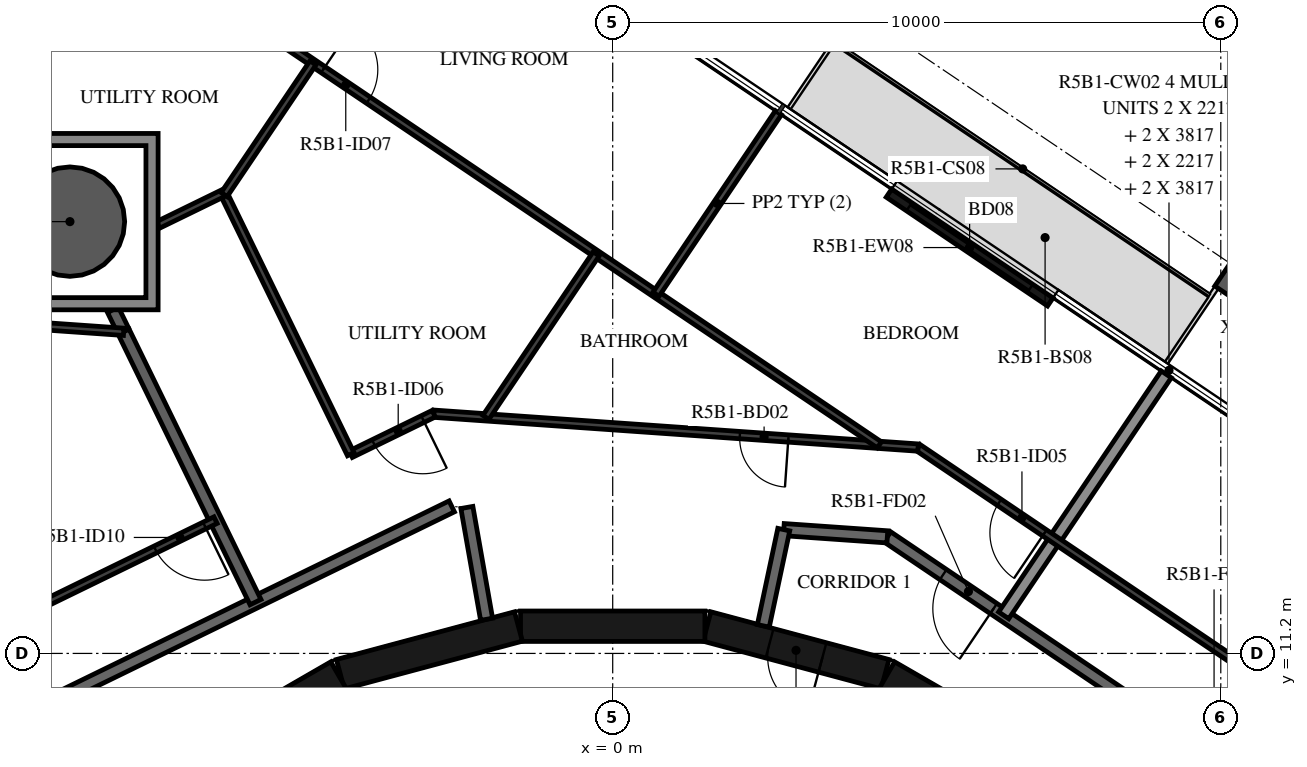
"""IFC4 building model, lengths in metres.
Left out: names, types, materials, properties, quantities, classifications, styles, units other than length and angle.
Written with IfcOpenShell. Run it as: python <this file> out.ifc"""

import sys

from ifc_helpers import new_model, si_unit, direction, frame, frame_2d, origin, origin_2d, place, context, subcontext, project, spatial, polyline, rectangle, hollow_circle, i_section, outline, extrude, element, fill, save


model = new_model("IFC4")
c1 = context("Model", 3, precision=1e-05, world=origin(), true_north=direction((0.0, 1.0)))
c2 = subcontext(c1, "Body", "Model", "MODEL_VIEW")
j1 = project(units=[si_unit("LENGTHUNIT", "METRE"), si_unit("PLANEANGLEUNIT", "RADIAN")], contexts=[c1])
p1 = place(None, origin())
s1 = spatial("IfcSite", under=j1, at=p1, CompositionType="ELEMENT")
p2 = place(p1, origin())
s2 = spatial("IfcBuilding", under=s1, at=p2, CompositionType="ELEMENT")
p3 = place(p2, frame((0.0, 0.0, 198.9)))
s3 = spatial("IfcBuildingStorey", under=s2, at=p3, CompositionType="ELEMENT", Elevation=198.9)
p4 = place(p3, frame((-8.926, 18.301, -0.38), z_axis=(0.0, 0.0, 1.0), x_axis=(1.0, 0.0, 0.0)))
e1 = element("IfcColumn", 1, at=p4, inside=s3, PredefinedType="COLUMN", context=c2, shape_type="SweptSolid", body=[
    extrude(hollow_circle(Radius=0.9, WallThickness=0.04, at=origin_2d()), origin(), (0.0, 0.0, 1.0), 3.5),
])
p5 = place(p3, frame((10.278, 17.531, -0.38), z_axis=(0.0, 0.0, 1.0), x_axis=(0.829037661466, -0.559192771654, 0.0)))
e2 = element("IfcColumn", 2, at=p5, inside=s3, PredefinedType="COLUMN", context=c2, shape_type="SweptSolid", body=[
    extrude(i_section(OverallWidth=0.3, OverallDepth=0.9, WebThickness=0.019, FlangeThickness=0.035, FilletRadius=0.03, at=origin_2d()), origin(), (0.0, 0.0, 1.0), 3.5),
])
p6 = place(p3, frame((7.196, 16.98, 0.0), z_axis=(0.0, 0.0, 1.0), x_axis=(-0.829044984211, 0.559181915082, 0.0)))
e3 = element("IfcWall", 3, at=p6, inside=s3, PredefinedType="STANDARD", context=c2, shape_type="SweptSolid", body=[
    extrude(rectangle(XDim=3.2, YDim=0.16, at=frame_2d((1.6, 0.0))), origin(), (0.0, 0.0, 1.0), 3.12),
])
p7 = place(p6, frame((0.4, 0.0, 0.0)))
e4 = element("IfcOpeningElement", 4, at=p7, cuts=e3, PredefinedType="OPENING", context=c2, shape_type="SweptSolid", body=[
    extrude(rectangle(XDim=2.4, YDim=2.4, at=frame_2d((1.2, 1.2))), frame((0.0, 0.09, 0.0), z_axis=(0.0, -1.0, 0.0), x_axis=(1.0, 0.0, 0.0)), (0.0, 0.0, 1.0), 0.18),
])
p8 = place(p3, frame((7.137, 9.329, 0.0), z_axis=(0.0, 0.0, 1.0), x_axis=(-0.865975092491, 0.500087131594, 0.0)))
e5 = element("IfcWall", 5, at=p8, inside=s3, PredefinedType="SHEAR", context=c2, shape_type="SweptSolid", body=[
    extrude(rectangle(XDim=3.033, YDim=0.5, at=frame_2d((1.516, 0.0))), origin(), (0.0, 0.0, 1.0), 3.12),
])
p9 = place(p3, frame((4.479, 10.858, 0.0), z_axis=(0.0, 0.0, 1.0), x_axis=(-0.965948410781, 0.258734743916, 0.0)))
e6 = element("IfcWall", 6, at=p9, inside=s3, PredefinedType="SHEAR", context=c2, shape_type="SweptSolid", body=[
    extrude(rectangle(XDim=3.033, YDim=0.5, at=frame_2d((1.516, 0.0))), origin(), (0.0, 0.0, 1.0), 3.12),
])
p10 = place(p9, frame((1.066, 0.0, 0.0)))
e7 = element("IfcOpeningElement", 7, at=p10, cuts=e6, PredefinedType="OPENING", context=c2, shape_type="SweptSolid", body=[
    extrude(rectangle(XDim=0.9, YDim=2.1, at=frame_2d((0.45, 1.05))), frame((0.0, 0.26, 0.0), z_axis=(0.0, -1.0, 0.0), x_axis=(1.0, 0.0, 0.0)), (0.0, 0.0, 1.0), 0.52),
])
for number, where, z_axis, x_axis in (
    (8, (1.516, 11.647, 0.0), (0.0, 0.0, 1.0), (-1.0, 0.0, 0.0)),
    (9, (-1.55, 11.643, 0.0), (0.0, 0.0, 1.0), (-0.966, -0.259, 0.0)),
    (10, (-4.51, 10.845, 0.0), (0.0, 0.0, 1.0), (-0.866, -0.5, 0.0)),
):
    element("IfcWall", number, at=place(p3, frame(where, z_axis=z_axis, x_axis=x_axis)), inside=s3, PredefinedType="SHEAR", context=c2, shape_type="SweptSolid", body=[
        extrude(rectangle(XDim=3.033, YDim=0.5, at=frame_2d((1.516, 0.0))), origin(), (0.0, 0.0, 1.0), 3.12),
    ])
p11 = place(p3, frame((10.47, 9.101, 0.0), z_axis=(0.0, 0.0, 1.0), x_axis=(-0.829035841718, 0.559195469534, 0.0)))
e11 = element("IfcWall", 11, at=p11, inside=s3, PredefinedType="STANDARD", context=c2, shape_type="SweptSolid", body=[
    extrude(rectangle(XDim=7.181, YDim=0.2, at=frame_2d((3.591, 0.0))), origin(), (0.0, 0.0, 1.0), 3.12),
])
p12 = place(p11, frame((0.2, 0.0, 0.0)))
e12 = element("IfcOpeningElement", 12, at=p12, cuts=e11, PredefinedType="OPENING", context=c2, shape_type="SweptSolid", body=[
    extrude(rectangle(XDim=1.0, YDim=2.1, at=frame_2d((0.5, 1.05))), frame((0.0, 0.11, 0.0), z_axis=(0.0, -1.0, 0.0), x_axis=(1.0, 0.0, 0.0)), (0.0, 0.0, 1.0), 0.22),
])
p13 = place(p11, frame((5.073, 0.0, 0.0)))
e13 = element("IfcOpeningElement", 13, at=p13, cuts=e11, PredefinedType="OPENING", context=c2, shape_type="SweptSolid", body=[
    extrude(rectangle(XDim=1.0, YDim=2.1, at=frame_2d((0.5, 1.05))), frame((0.0, 0.11, 0.0), z_axis=(0.0, -1.0, 0.0), x_axis=(1.0, 0.0, 0.0)), (0.0, 0.0, 1.0), 0.22),
])
p14 = place(p3, frame((4.517, 13.117, 0.0), z_axis=(0.0, 0.0, 1.0), x_axis=(-0.997562153664, 0.069783591025, 0.0)))
e14 = element("IfcWall", 14, at=p14, inside=s3, PredefinedType="STANDARD", context=c2, shape_type="SweptSolid", body=[
    extrude(rectangle(XDim=1.707, YDim=0.2, at=frame_2d((0.854, 0.0))), origin(), (0.0, 0.0, 1.0), 3.12),
])
p15 = place(p3, frame((2.813, 13.236, 0.0), z_axis=(0.0, 0.0, 1.0), x_axis=(-0.207911086063, -0.978147729278, 0.0)))
e15 = element("IfcWall", 15, at=p15, inside=s3, PredefinedType="STANDARD", context=c2, shape_type="SweptSolid", body=[
    extrude(rectangle(XDim=1.618, YDim=0.2, at=frame_2d((0.809, 0.0))), origin(), (0.0, 0.0, 1.0), 3.12),
])
p16 = place(p3, frame((-2.074, 11.761, 0.0), z_axis=(0.0, 0.0, 1.0), x_axis=(-0.173740587112, 0.984791454263, 0.0)))
e16 = element("IfcWall", 16, at=p16, inside=s3, PredefinedType="STANDARD", context=c2, shape_type="SweptSolid", body=[
    extrude(rectangle(XDim=1.867, YDim=0.2, at=frame_2d((0.934, 0.0))), origin(), (0.0, 0.0, 1.0), 3.12),
])
p17 = place(p3, frame((-2.647, 13.618, 0.0), z_axis=(0.0, 0.0, 1.0), x_axis=(-0.898796543751, -0.438366026218, 0.0)))
e17 = element("IfcWall", 17, at=p17, inside=s3, PredefinedType="STANDARD", context=c2, shape_type="SweptSolid", body=[
    extrude(rectangle(XDim=7.181, YDim=0.2, at=frame_2d((3.591, 0.0))), origin(), (0.0, 0.0, 1.0), 3.12),
])
p18 = place(p3, frame((9.104, 15.79, 0.0), z_axis=(0.0, 0.0, 1.0), x_axis=(-0.559193912135, -0.829036892201, 0.0)))
e18 = element("IfcWall", 18, at=p18, inside=s3, PredefinedType="STANDARD", context=c2, shape_type="SweptSolid", body=[
    extrude(rectangle(XDim=4.781, YDim=0.2, at=frame_2d((2.39, 0.0))), origin(), (0.0, 0.0, 1.0), 2.73),
])
p19 = place(p3, frame((-8.042, 16.489, 0.0), z_axis=(0.0, 0.0, 1.0), x_axis=(0.438345825707, -0.898806395774, 0.0)))
e19 = element("IfcWall", 19, at=p19, inside=s3, PredefinedType="STANDARD", context=c2, shape_type="SweptSolid", body=[
    extrude(rectangle(XDim=4.946, YDim=0.2, at=frame_2d((2.473, 0.0))), origin(), (0.0, 0.0, 1.0), 3.12),
])
p20 = place(p3, frame((-8.219, 16.851, 0.0), z_axis=(0.0, 0.0, 1.0), x_axis=(0.438281645094, -0.898837693676, 0.0)))
e20 = element("IfcWall", 20, at=p20, inside=s3, PredefinedType="STANDARD", context=c2, shape_type="SweptSolid", body=[
    extrude(rectangle(XDim=0.373, YDim=0.2, at=frame_2d((0.186, 0.0))), origin(), (0.0, 0.0, 1.0), 3.12),
])
p21 = place(p3, frame((11.642, 10.12, 0.0), z_axis=(0.0, 0.0, 1.0), x_axis=(-0.829032241779, 0.55920080659, 0.0)))
e21 = element("IfcWall", 21, at=p21, inside=s3, PredefinedType="PARTITIONING", context=c2, shape_type="SweptSolid", body=[
    extrude(rectangle(XDim=7.985, YDim=0.12, at=frame_2d((3.992, 0.0))), origin(), (0.0, 0.0, 1.0), 3.12),
])
p22 = place(p21, frame((0.2, 0.0, 0.0)))
e22 = element("IfcOpeningElement", 22, at=p22, cuts=e21, PredefinedType="OPENING", context=c2, shape_type="SweptSolid", body=[
    extrude(rectangle(XDim=0.9, YDim=2.1, at=frame_2d((0.45, 1.05))), frame((0.0, 0.07, 0.0), z_axis=(0.0, -1.0, 0.0), x_axis=(1.0, 0.0, 0.0)), (0.0, 0.0, 1.0), 0.14),
])
p23 = place(p21, frame((5.475, 0.0, 0.0)))
e23 = element("IfcOpeningElement", 23, at=p23, cuts=e21, PredefinedType="OPENING", context=c2, shape_type="SweptSolid", body=[
    extrude(rectangle(XDim=0.9, YDim=2.1, at=frame_2d((0.45, 1.05))), frame((0.0, 0.07, 0.0), z_axis=(0.0, -1.0, 0.0), x_axis=(1.0, 0.0, 0.0)), (0.0, 0.0, 1.0), 0.14),
])
p24 = place(p3, frame((5.022, 14.585, 0.0), z_axis=(0.0, 0.0, 1.0), x_axis=(-0.997565118395, 0.069741197017, 0.0)))
e24 = element("IfcWall", 24, at=p24, inside=s3, PredefinedType="PARTITIONING", context=c2, shape_type="SweptSolid", body=[
    extrude(rectangle(XDim=7.985, YDim=0.12, at=frame_2d((3.993, 0.0))), origin(), (0.0, 0.0, 1.0), 3.12),
])
p25 = place(p24, frame((2.138, 0.0, 0.0)))
e25 = element("IfcOpeningElement", 25, at=p25, cuts=e24, PredefinedType="OPENING", context=c2, shape_type="SweptSolid", body=[
    extrude(rectangle(XDim=0.8, YDim=2.1, at=frame_2d((0.4, 1.05))), frame((0.0, 0.07, 0.0), z_axis=(0.0, -1.0, 0.0), x_axis=(1.0, 0.0, 0.0)), (0.0, 0.0, 1.0), 0.14),
])
p26 = place(p3, frame((-2.943, 15.142, 0.0), z_axis=(0.0, 0.0, 1.0), x_axis=(-0.898853439798, -0.438249351127, 0.0)))
e26 = element("IfcWall", 26, at=p26, inside=s3, PredefinedType="PARTITIONING", context=c2, shape_type="SweptSolid", body=[
    extrude(rectangle(XDim=1.518, YDim=0.12, at=frame_2d((0.759, 0.0))), origin(), (0.0, 0.0, 1.0), 3.12),
])
p27 = place(p26, frame((0.2, 0.0, 0.0)))
e27 = element("IfcOpeningElement", 27, at=p27, cuts=e26, PredefinedType="OPENING", context=c2, shape_type="SweptSolid", body=[
    extrude(rectangle(XDim=0.9, YDim=2.1, at=frame_2d((0.45, 1.05))), frame((0.0, 0.07, 0.0), z_axis=(0.0, -1.0, 0.0), x_axis=(1.0, 0.0, 0.0)), (0.0, 0.0, 1.0), 0.14),
])
p28 = place(p3, frame((-4.308, 14.477, 0.0), z_axis=(0.0, 0.0, 1.0), x_axis=(-0.43837096777, 0.898794133613, 0.0)))
e28 = element("IfcWall", 28, at=p28, inside=s3, PredefinedType="PARTITIONING", context=c2, shape_type="SweptSolid", body=[
    extrude(rectangle(XDim=4.75, YDim=0.12, at=frame_2d((2.375, 0.0))), origin(), (0.0, 0.0, 1.0), 3.12),
])
p29 = place(p3, frame((-6.402, 18.771, 0.0), z_axis=(0.0, 0.0, 1.0), x_axis=(-0.898797905192, -0.438363234797, 0.0)))
e29 = element("IfcWall", 29, at=p29, inside=s3, PredefinedType="PARTITIONING", context=c2, shape_type="SweptSolid", body=[
    extrude(rectangle(XDim=1.195, YDim=0.12, at=frame_2d((0.597, 0.0))), origin(), (0.0, 0.0, 1.0), 3.12),
])
p30 = place(p3, frame((-6.292, 21.831, 0.0), z_axis=(0.0, 0.0, 1.0), x_axis=(0.829040041754, -0.559189242715, 0.0)))
e30 = element("IfcWall", 30, at=p30, inside=s3, PredefinedType="PARTITIONING", context=c2, shape_type="SweptSolid", body=[
    extrude(rectangle(XDim=12.879, YDim=0.12, at=frame_2d((6.439, 0.0))), origin(), (0.0, 0.0, 1.0), 3.12),
])
p31 = place(p30, frame((1.844, 0.0, 0.0)))
e31 = element("IfcOpeningElement", 31, at=p31, cuts=e30, PredefinedType="OPENING", context=c2, shape_type="SweptSolid", body=[
    extrude(rectangle(XDim=0.9, YDim=2.1, at=frame_2d((0.45, 1.05))), frame((0.0, 0.07, 0.0), z_axis=(0.0, -1.0, 0.0), x_axis=(1.0, 0.0, 0.0)), (0.0, 0.0, 1.0), 0.14),
])
p32 = place(p30, frame((0.2, 0.0, 0.0)))
e32 = element("IfcOpeningElement", 32, at=p32, cuts=e30, PredefinedType="OPENING", context=c2, shape_type="SweptSolid", body=[
    extrude(rectangle(XDim=0.9, YDim=2.1, at=frame_2d((0.45, 1.05))), frame((0.0, 0.07, 0.0), z_axis=(0.0, -1.0, 0.0), x_axis=(1.0, 0.0, 0.0)), (0.0, 0.0, 1.0), 0.14),
])
p33 = place(p3, frame((2.725, 20.092, 0.0), z_axis=(0.0, 0.0, 1.0), x_axis=(-0.559230560117, -0.829012171582, 0.0)))
e33 = element("IfcWall", 33, at=p33, inside=s3, PredefinedType="PARTITIONING", context=c2, shape_type="SweptSolid", body=[
    extrude(rectangle(XDim=3.6, YDim=0.12, at=frame_2d((1.8, 0.0))), origin(), (0.0, 0.0, 1.0), 2.73),
])
p34 = place(p3, frame((-0.272, 17.771, 0.0), z_axis=(0.0, 0.0, 1.0), x_axis=(-0.559174158254, -0.829050216055, 0.0)))
e34 = element("IfcWall", 34, at=p34, inside=s3, PredefinedType="PARTITIONING", context=c2, shape_type="SweptSolid", body=[
    extrude(rectangle(XDim=3.243, YDim=0.12, at=frame_2d((1.622, 0.0))), origin(), (0.0, 0.0, 1.0), 3.12),
])
p35 = place(p3, frame((-4.929, 20.912, 0.0), z_axis=(0.0, 0.0, 1.0), x_axis=(-0.559155109057, -0.829063063955, 0.0)))
e35 = element("IfcWall", 35, at=p35, inside=s3, PredefinedType="PARTITIONING", context=c2, shape_type="SweptSolid", body=[
    extrude(rectangle(XDim=2.613, YDim=0.12, at=frame_2d((1.307, 0.0))), origin(), (0.0, 0.0, 1.0), 3.12),
])
p36 = place(p3, frame((-6.532, 13.392, 0.0), z_axis=(0.0, 0.0, 1.0), x_axis=(-0.898786663593, -0.438386283256, 0.0)))
e36 = element("IfcWall", 36, at=p36, inside=s3, PredefinedType="PARTITIONING", context=c2, shape_type="SweptSolid", body=[
    extrude(rectangle(XDim=3.992, YDim=0.12, at=frame_2d((1.996, 0.0))), origin(), (0.0, 0.0, 1.0), 3.12),
])
p37 = place(p36, frame((0.2, 0.0, 0.0)))
e37 = element("IfcOpeningElement", 37, at=p37, cuts=e36, PredefinedType="OPENING", context=c2, shape_type="SweptSolid", body=[
    extrude(rectangle(XDim=0.9, YDim=2.1, at=frame_2d((0.45, 1.05))), frame((0.0, 0.07, 0.0), z_axis=(0.0, -1.0, 0.0), x_axis=(1.0, 0.0, 0.0)), (0.0, 0.0, 1.0), 0.14),
])
p38 = place(p3, frame((-13.437, 16.866, 0.0), z_axis=(0.0, 0.0, 1.0), x_axis=(0.997564592961, -0.06974871232, 0.0)))
e38 = element("IfcWall", 38, at=p38, inside=s3, PredefinedType="PARTITIONING", context=c2, shape_type="SweptSolid", body=[
    extrude(rectangle(XDim=5.408, YDim=0.12, at=frame_2d((2.704, 0.0))), origin(), (0.0, 0.0, 1.0), 3.12),
])
p39 = place(p38, frame((0.2, 0.0, 0.0)))
e39 = element("IfcOpeningElement", 39, at=p39, cuts=e38, PredefinedType="OPENING", context=c2, shape_type="SweptSolid", body=[
    extrude(rectangle(XDim=0.9, YDim=2.1, at=frame_2d((0.45, 1.05))), frame((0.0, 0.07, 0.0), z_axis=(0.0, -1.0, 0.0), x_axis=(1.0, 0.0, 0.0)), (0.0, 0.0, 1.0), 0.14),
])
p40 = place(p3, origin())
e40 = element("IfcWall", 40, at=p40, inside=s3, PredefinedType="STANDARD", context=c2, shape_type="SweptSolid", body=[
    extrude(outline(polyline([(-7.476, 19.751), (-7.476, 16.851), (-10.376, 16.851), (-10.376, 19.751), (-7.476, 19.751)]), holes=[polyline([(-10.176, 17.051), (-7.676, 17.051), (-7.676, 19.551), (-10.176, 19.551), (-10.176, 17.051)])]), origin(), (0.0, 0.0, 1.0), 3.12),
])
p41 = place(p7, origin())
e41 = element("IfcDoor", 41, at=p41, inside=s3, OperationType="DOUBLE_DOOR_SLIDING", PredefinedType="DOOR", context=c2, shape_type="SweptSolid", body=[
    extrude(rectangle(XDim=2.4, YDim=2.4, at=frame_2d((1.2, 1.2))), frame((0.0, 0.025, 0.0), z_axis=(0.0, -1.0, 0.0), x_axis=(1.0, 0.0, 0.0)), (0.0, 0.0, 1.0), 0.05),
])
fill(e4, e41)
p42 = place(p10, origin())
e42 = element("IfcDoor", 42, at=p42, inside=s3, OperationType="SINGLE_SWING_LEFT", PredefinedType="DOOR", context=c2, shape_type="SweptSolid", body=[
    extrude(rectangle(XDim=0.9, YDim=2.1, at=frame_2d((0.45, 1.05))), frame((0.0, 0.025, 0.0), z_axis=(0.0, -1.0, 0.0), x_axis=(1.0, 0.0, 0.0)), (0.0, 0.0, 1.0), 0.05),
])
fill(e7, e42)
p43 = place(p13, origin())
e43 = element("IfcDoor", 43, at=p43, inside=s3, OperationType="SINGLE_SWING_RIGHT", PredefinedType="DOOR", context=c2, shape_type="SweptSolid", body=[
    extrude(rectangle(XDim=1.0, YDim=2.1, at=frame_2d((0.5, 1.05))), frame((0.0, 0.025, 0.0), z_axis=(0.0, -1.0, 0.0), x_axis=(1.0, 0.0, 0.0)), (0.0, 0.0, 1.0), 0.05),
])
fill(e13, e43)
p44 = place(p23, origin())
e44 = element("IfcDoor", 44, at=p44, inside=s3, OperationType="SINGLE_SWING_RIGHT", PredefinedType="DOOR", context=c2, shape_type="SweptSolid", body=[
    extrude(rectangle(XDim=0.9, YDim=2.1, at=frame_2d((0.45, 1.05))), frame((0.0, 0.025, 0.0), z_axis=(0.0, -1.0, 0.0), x_axis=(1.0, 0.0, 0.0)), (0.0, 0.0, 1.0), 0.05),
])
fill(e23, e44)
p45 = place(p25, origin())
e45 = element("IfcDoor", 45, at=p45, inside=s3, OperationType="SINGLE_SWING_RIGHT", PredefinedType="DOOR", context=c2, shape_type="SweptSolid", body=[
    extrude(rectangle(XDim=0.8, YDim=2.1, at=frame_2d((0.4, 1.05))), frame((0.0, 0.025, 0.0), z_axis=(0.0, -1.0, 0.0), x_axis=(1.0, 0.0, 0.0)), (0.0, 0.0, 1.0), 0.05),
])
fill(e25, e45)
p46 = place(p27, origin())
e46 = element("IfcDoor", 46, at=p46, inside=s3, OperationType="SINGLE_SWING_RIGHT", PredefinedType="DOOR", context=c2, shape_type="SweptSolid", body=[
    extrude(rectangle(XDim=0.9, YDim=2.1, at=frame_2d((0.45, 1.05))), frame((0.0, 0.025, 0.0), z_axis=(0.0, -1.0, 0.0), x_axis=(1.0, 0.0, 0.0)), (0.0, 0.0, 1.0), 0.05),
])
fill(e27, e46)
p47 = place(p31, origin())
e47 = element("IfcDoor", 47, at=p47, inside=s3, OperationType="SINGLE_SWING_RIGHT", PredefinedType="DOOR", context=c2, shape_type="SweptSolid", body=[
    extrude(rectangle(XDim=0.9, YDim=2.1, at=frame_2d((0.45, 1.05))), frame((0.0, 0.025, 0.0), z_axis=(0.0, -1.0, 0.0), x_axis=(1.0, 0.0, 0.0)), (0.0, 0.0, 1.0), 0.05),
])
fill(e31, e47)
p48 = place(p37, origin())
e48 = element("IfcDoor", 48, at=p48, inside=s3, OperationType="SINGLE_SWING_LEFT", PredefinedType="DOOR", context=c2, shape_type="SweptSolid", body=[
    extrude(rectangle(XDim=0.9, YDim=2.1, at=frame_2d((0.45, 1.05))), frame((0.0, 0.025, 0.0), z_axis=(0.0, -1.0, 0.0), x_axis=(1.0, 0.0, 0.0)), (0.0, 0.0, 1.0), 0.05),
])
fill(e37, e48)
save(model, sys.argv[1])
